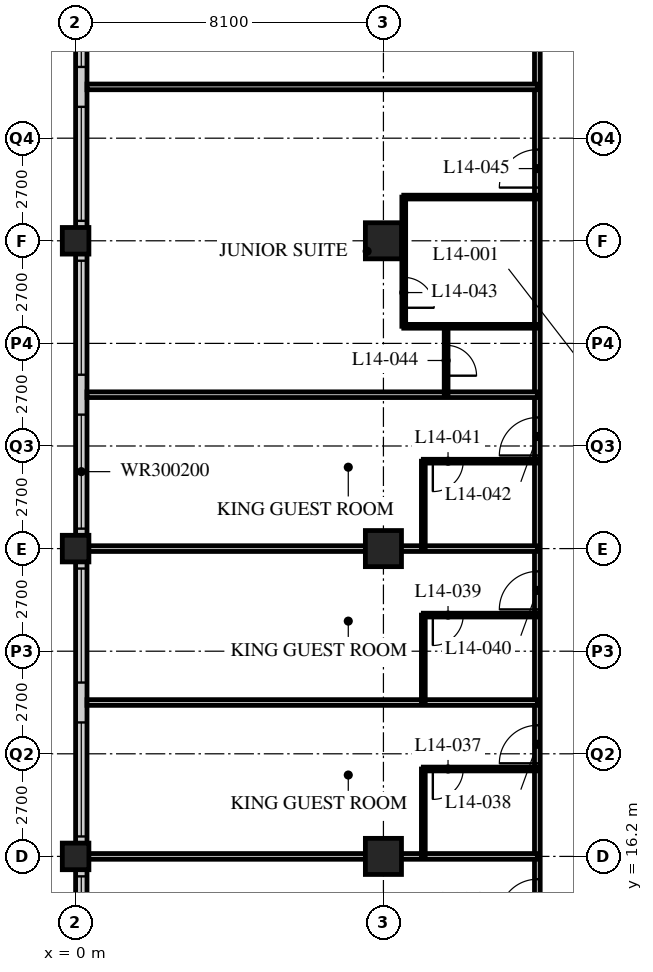
"""IFC4 building model, lengths in metres.
Left out: names, types, materials, properties, quantities, classifications, styles, units other than length and angle.
Written with IfcOpenShell. Run it as: python <this file> out.ifc"""

import sys

from ifc_helpers import new_model, si_unit, direction, frame, frame_2d, origin, origin_2d, place, context, subcontext, project, spatial, rectangle, hollow_rectangle, extrude, element, fill, save


model = new_model("IFC4")
c1 = context("Model", 3, precision=1e-05, world=origin(), true_north=direction((0.0, 1.0)))
c2 = subcontext(c1, "Body", "Model", "MODEL_VIEW")
j1 = project(units=[si_unit("LENGTHUNIT", "METRE"), si_unit("PLANEANGLEUNIT", "RADIAN")], contexts=[c1])
p1 = place(None, origin())
s1 = spatial("IfcSite", under=j1, at=p1, CompositionType="ELEMENT")
p2 = place(p1, origin())
s2 = spatial("IfcBuilding", under=s1, at=p2, CompositionType="ELEMENT")
p3 = place(p2, frame((0.0, 0.0, 60.2)))
s3 = spatial("IfcBuildingStorey", under=s2, at=p3, CompositionType="ELEMENT", Elevation=60.2)
for number, where, z_axis, x_axis in (
    (1, (0.0, 16.2, 0.0), (0.0, 0.0, 1.0), (1.0, 0.0, 0.0)),
    (2, (0.0, 24.3, 0.0), (0.0, 0.0, 1.0), (1.0, 0.0, 0.0)),
    (3, (0.0, 32.4, 0.0), (0.0, 0.0, 1.0), (1.0, 0.0, 0.0)),
):
    element("IfcColumn", number, at=place(p3, frame(where, z_axis=z_axis, x_axis=x_axis)), inside=s3, PredefinedType="COLUMN", context=c2, shape_type="SweptSolid", body=[
        extrude(hollow_rectangle(XDim=0.7, YDim=0.7, WallThickness=0.06, at=origin_2d()), origin(), (0.0, 0.0, 1.0), 3.4),
    ])
for number, where, z_axis, x_axis in (
    (4, (8.1, 16.2, 0.0), (0.0, 0.0, 1.0), (1.0, 0.0, 0.0)),
    (5, (8.1, 24.3, 0.0), (0.0, 0.0, 1.0), (1.0, 0.0, 0.0)),
    (6, (8.1, 32.4, 0.0), (0.0, 0.0, 1.0), (1.0, 0.0, 0.0)),
):
    element("IfcColumn", number, at=place(p3, frame(where, z_axis=z_axis, x_axis=x_axis)), inside=s3, PredefinedType="COLUMN", context=c2, shape_type="SweptSolid", body=[
        extrude(hollow_rectangle(XDim=0.95, YDim=0.95, WallThickness=0.095, at=origin_2d()), origin(), (0.0, 0.0, 1.0), 3.4),
    ])
p4 = place(p3, frame((0.15, 40.2, 0.0), z_axis=(0.0, 0.0, 1.0), x_axis=(0.0, -1.0, 0.0)))
e7 = element("IfcWall", 7, at=p4, inside=s3, PredefinedType="SOLIDWALL", context=c2, shape_type="SweptSolid", body=[
    extrude(rectangle(XDim=32.1, YDim=0.3, at=frame_2d((16.05, 0.0))), origin(), (0.0, 0.0, 1.0), 3.19),
])
p5 = place(p4, frame((0.225, 0.0, 0.9)))
e8 = element("IfcOpeningElement", 8, at=p5, cuts=e7, PredefinedType="OPENING", context=c2, shape_type="SweptSolid", body=[
    extrude(rectangle(XDim=3.0, YDim=2.0, at=frame_2d((1.5, 1.0))), frame((0.0, 0.16, 0.0), z_axis=(0.0, -1.0, 0.0), x_axis=(1.0, 0.0, 0.0)), (0.0, 0.0, 1.0), 0.32),
])
p6 = place(p4, frame((4.275, 0.0, 0.9)))
e9 = element("IfcOpeningElement", 9, at=p6, cuts=e7, PredefinedType="OPENING", context=c2, shape_type="SweptSolid", body=[
    extrude(rectangle(XDim=3.0, YDim=2.0, at=frame_2d((1.5, 1.0))), frame((0.0, 0.16, 0.0), z_axis=(0.0, -1.0, 0.0), x_axis=(1.0, 0.0, 0.0)), (0.0, 0.0, 1.0), 0.32),
])
p7 = place(p4, frame((8.325, 0.0, 0.9)))
e10 = element("IfcOpeningElement", 10, at=p7, cuts=e7, PredefinedType="OPENING", context=c2, shape_type="SweptSolid", body=[
    extrude(rectangle(XDim=3.0, YDim=2.0, at=frame_2d((1.5, 1.0))), frame((0.0, 0.16, 0.0), z_axis=(0.0, -1.0, 0.0), x_axis=(1.0, 0.0, 0.0)), (0.0, 0.0, 1.0), 0.32),
])
p8 = place(p4, frame((12.375, 0.0, 0.9)))
e11 = element("IfcOpeningElement", 11, at=p8, cuts=e7, PredefinedType="OPENING", context=c2, shape_type="SweptSolid", body=[
    extrude(rectangle(XDim=3.0, YDim=2.0, at=frame_2d((1.5, 1.0))), frame((0.0, 0.16, 0.0), z_axis=(0.0, -1.0, 0.0), x_axis=(1.0, 0.0, 0.0)), (0.0, 0.0, 1.0), 0.32),
])
p9 = place(p4, frame((16.425, 0.0, 0.9)))
e12 = element("IfcOpeningElement", 12, at=p9, cuts=e7, PredefinedType="OPENING", context=c2, shape_type="SweptSolid", body=[
    extrude(rectangle(XDim=3.0, YDim=2.0, at=frame_2d((1.5, 1.0))), frame((0.0, 0.16, 0.0), z_axis=(0.0, -1.0, 0.0), x_axis=(1.0, 0.0, 0.0)), (0.0, 0.0, 1.0), 0.32),
])
p10 = place(p4, frame((20.475, 0.0, 0.9)))
e13 = element("IfcOpeningElement", 13, at=p10, cuts=e7, PredefinedType="OPENING", context=c2, shape_type="SweptSolid", body=[
    extrude(rectangle(XDim=3.0, YDim=2.0, at=frame_2d((1.5, 1.0))), frame((0.0, 0.16, 0.0), z_axis=(0.0, -1.0, 0.0), x_axis=(1.0, 0.0, 0.0)), (0.0, 0.0, 1.0), 0.32),
])
p11 = place(p4, frame((24.525, 0.0, 0.9)))
e14 = element("IfcOpeningElement", 14, at=p11, cuts=e7, PredefinedType="OPENING", context=c2, shape_type="SweptSolid", body=[
    extrude(rectangle(XDim=3.0, YDim=2.0, at=frame_2d((1.5, 1.0))), frame((0.0, 0.16, 0.0), z_axis=(0.0, -1.0, 0.0), x_axis=(1.0, 0.0, 0.0)), (0.0, 0.0, 1.0), 0.32),
])
p12 = place(p4, frame((28.575, 0.0, 0.9)))
e15 = element("IfcOpeningElement", 15, at=p12, cuts=e7, PredefinedType="OPENING", context=c2, shape_type="SweptSolid", body=[
    extrude(rectangle(XDim=3.0, YDim=2.0, at=frame_2d((1.5, 1.0))), frame((0.0, 0.16, 0.0), z_axis=(0.0, -1.0, 0.0), x_axis=(1.0, 0.0, 0.0)), (0.0, 0.0, 1.0), 0.32),
])
p13 = place(p3, frame((12.15, 12.15, 0.0), z_axis=(0.0, 0.0, 1.0), x_axis=(0.0, 1.0, 0.0)))
e16 = element("IfcWall", 16, at=p13, inside=s3, PredefinedType="PARTITIONING", context=c2, shape_type="SweptSolid", body=[
    extrude(rectangle(XDim=30.15, YDim=0.15, at=frame_2d((15.075, 0.0))), origin(), (0.0, 0.0, 1.0), 3.19),
])
p14 = place(p13, frame((2.45, 0.0, 0.0)))
e17 = element("IfcOpeningElement", 17, at=p14, cuts=e16, PredefinedType="OPENING", context=c2, shape_type="SweptSolid", body=[
    extrude(rectangle(XDim=1.0, YDim=2.1, at=frame_2d((0.5, 1.05))), frame((0.0, 0.085, 0.0), z_axis=(0.0, -1.0, 0.0), x_axis=(1.0, 0.0, 0.0)), (0.0, 0.0, 1.0), 0.17),
])
p15 = place(p13, frame((6.5, 0.0, 0.0)))
e18 = element("IfcOpeningElement", 18, at=p15, cuts=e16, PredefinedType="OPENING", context=c2, shape_type="SweptSolid", body=[
    extrude(rectangle(XDim=1.0, YDim=2.1, at=frame_2d((0.5, 1.05))), frame((0.0, 0.085, 0.0), z_axis=(0.0, -1.0, 0.0), x_axis=(1.0, 0.0, 0.0)), (0.0, 0.0, 1.0), 0.17),
])
p16 = place(p13, frame((10.55, 0.0, 0.0)))
e19 = element("IfcOpeningElement", 19, at=p16, cuts=e16, PredefinedType="OPENING", context=c2, shape_type="SweptSolid", body=[
    extrude(rectangle(XDim=1.0, YDim=2.1, at=frame_2d((0.5, 1.05))), frame((0.0, 0.085, 0.0), z_axis=(0.0, -1.0, 0.0), x_axis=(1.0, 0.0, 0.0)), (0.0, 0.0, 1.0), 0.17),
])
p17 = place(p13, frame((14.6, 0.0, 0.0)))
e20 = element("IfcOpeningElement", 20, at=p17, cuts=e16, PredefinedType="OPENING", context=c2, shape_type="SweptSolid", body=[
    extrude(rectangle(XDim=1.0, YDim=2.1, at=frame_2d((0.5, 1.05))), frame((0.0, 0.085, 0.0), z_axis=(0.0, -1.0, 0.0), x_axis=(1.0, 0.0, 0.0)), (0.0, 0.0, 1.0), 0.17),
])
p18 = place(p13, frame((21.65, 0.0, 0.0)))
e21 = element("IfcOpeningElement", 21, at=p18, cuts=e16, PredefinedType="OPENING", context=c2, shape_type="SweptSolid", body=[
    extrude(rectangle(XDim=1.0, YDim=2.1, at=frame_2d((0.5, 1.05))), frame((0.0, 0.085, 0.0), z_axis=(0.0, -1.0, 0.0), x_axis=(1.0, 0.0, 0.0)), (0.0, 0.0, 1.0), 0.17),
])
p19 = place(p13, frame((26.7, 0.0, 0.0)))
e22 = element("IfcOpeningElement", 22, at=p19, cuts=e16, PredefinedType="OPENING", context=c2, shape_type="SweptSolid", body=[
    extrude(rectangle(XDim=1.0, YDim=2.1, at=frame_2d((0.5, 1.05))), frame((0.0, 0.085, 0.0), z_axis=(0.0, -1.0, 0.0), x_axis=(1.0, 0.0, 0.0)), (0.0, 0.0, 1.0), 0.17),
])
p20 = place(p3, frame((12.15, 16.2, 0.0), z_axis=(0.0, 0.0, 1.0), x_axis=(-1.0, 0.0, 0.0)))
e23 = element("IfcWall", 23, at=p20, inside=s3, PredefinedType="PARTITIONING", context=c2, shape_type="SweptSolid", body=[
    extrude(rectangle(XDim=11.85, YDim=0.15, at=frame_2d((5.925, 0.0))), origin(), (0.0, 0.0, 1.0), 2.578),
])
p21 = place(p3, frame((9.15, 16.2, 0.0), z_axis=(0.0, 0.0, 1.0), x_axis=(0.0, 1.0, 0.0)))
e24 = element("IfcWall", 24, at=p21, inside=s3, PredefinedType="PARTITIONING", context=c2, shape_type="SweptSolid", body=[
    extrude(rectangle(XDim=2.3, YDim=0.1, at=frame_2d((1.15, 0.0))), origin(), (0.0, 0.0, 1.0), 3.19),
])
p22 = place(p3, frame((12.15, 18.5, 0.0), z_axis=(0.0, 0.0, 1.0), x_axis=(-1.0, 0.0, 0.0)))
e25 = element("IfcWall", 25, at=p22, inside=s3, PredefinedType="PARTITIONING", context=c2, shape_type="SweptSolid", body=[
    extrude(rectangle(XDim=3.0, YDim=0.1, at=frame_2d((1.5, 0.0))), origin(), (0.0, 0.0, 1.0), 3.19),
])
p23 = place(p22, frame((1.95, 0.0, 0.0)))
e26 = element("IfcOpeningElement", 26, at=p23, cuts=e25, PredefinedType="OPENING", context=c2, shape_type="SweptSolid", body=[
    extrude(rectangle(XDim=0.8, YDim=2.1, at=frame_2d((0.4, 1.05))), frame((0.0, 0.06, 0.0), z_axis=(0.0, -1.0, 0.0), x_axis=(1.0, 0.0, 0.0)), (0.0, 0.0, 1.0), 0.12),
])
p24 = place(p3, frame((12.15, 20.25, 0.0), z_axis=(0.0, 0.0, 1.0), x_axis=(-1.0, 0.0, 0.0)))
e27 = element("IfcWall", 27, at=p24, inside=s3, PredefinedType="PARTITIONING", context=c2, shape_type="SweptSolid", body=[
    extrude(rectangle(XDim=11.85, YDim=0.15, at=frame_2d((5.925, 0.0))), origin(), (0.0, 0.0, 1.0), 3.19),
])
p25 = place(p3, frame((9.15, 20.25, 0.0), z_axis=(0.0, 0.0, 1.0), x_axis=(0.0, 1.0, 0.0)))
e28 = element("IfcWall", 28, at=p25, inside=s3, PredefinedType="PARTITIONING", context=c2, shape_type="SweptSolid", body=[
    extrude(rectangle(XDim=2.3, YDim=0.1, at=frame_2d((1.15, 0.0))), origin(), (0.0, 0.0, 1.0), 3.19),
])
p26 = place(p3, frame((12.15, 22.55, 0.0), z_axis=(0.0, 0.0, 1.0), x_axis=(-1.0, 0.0, 0.0)))
e29 = element("IfcWall", 29, at=p26, inside=s3, PredefinedType="PARTITIONING", context=c2, shape_type="SweptSolid", body=[
    extrude(rectangle(XDim=3.0, YDim=0.1, at=frame_2d((1.5, 0.0))), origin(), (0.0, 0.0, 1.0), 3.19),
])
p27 = place(p26, frame((1.95, 0.0, 0.0)))
e30 = element("IfcOpeningElement", 30, at=p27, cuts=e29, PredefinedType="OPENING", context=c2, shape_type="SweptSolid", body=[
    extrude(rectangle(XDim=0.8, YDim=2.1, at=frame_2d((0.4, 1.05))), frame((0.0, 0.06, 0.0), z_axis=(0.0, -1.0, 0.0), x_axis=(1.0, 0.0, 0.0)), (0.0, 0.0, 1.0), 0.12),
])
p28 = place(p3, frame((12.15, 24.3, 0.0), z_axis=(0.0, 0.0, 1.0), x_axis=(-1.0, 0.0, 0.0)))
e31 = element("IfcWall", 31, at=p28, inside=s3, PredefinedType="PARTITIONING", context=c2, shape_type="SweptSolid", body=[
    extrude(rectangle(XDim=11.85, YDim=0.15, at=frame_2d((5.925, 0.0))), origin(), (0.0, 0.0, 1.0), 2.578),
])
p29 = place(p3, frame((9.15, 24.3, 0.0), z_axis=(0.0, 0.0, 1.0), x_axis=(0.0, 1.0, 0.0)))
e32 = element("IfcWall", 32, at=p29, inside=s3, PredefinedType="PARTITIONING", context=c2, shape_type="SweptSolid", body=[
    extrude(rectangle(XDim=2.3, YDim=0.1, at=frame_2d((1.15, 0.0))), origin(), (0.0, 0.0, 1.0), 3.19),
])
p30 = place(p3, frame((12.15, 26.6, 0.0), z_axis=(0.0, 0.0, 1.0), x_axis=(-1.0, 0.0, 0.0)))
e33 = element("IfcWall", 33, at=p30, inside=s3, PredefinedType="PARTITIONING", context=c2, shape_type="SweptSolid", body=[
    extrude(rectangle(XDim=3.0, YDim=0.1, at=frame_2d((1.5, 0.0))), origin(), (0.0, 0.0, 1.0), 3.19),
])
p31 = place(p30, frame((1.95, 0.0, 0.0)))
e34 = element("IfcOpeningElement", 34, at=p31, cuts=e33, PredefinedType="OPENING", context=c2, shape_type="SweptSolid", body=[
    extrude(rectangle(XDim=0.8, YDim=2.1, at=frame_2d((0.4, 1.05))), frame((0.0, 0.06, 0.0), z_axis=(0.0, -1.0, 0.0), x_axis=(1.0, 0.0, 0.0)), (0.0, 0.0, 1.0), 0.12),
])
p32 = place(p3, frame((12.15, 28.35, 0.0), z_axis=(0.0, 0.0, 1.0), x_axis=(-1.0, 0.0, 0.0)))
e35 = element("IfcWall", 35, at=p32, inside=s3, PredefinedType="PARTITIONING", context=c2, shape_type="SweptSolid", body=[
    extrude(rectangle(XDim=11.85, YDim=0.15, at=frame_2d((5.925, 0.0))), origin(), (0.0, 0.0, 1.0), 3.19),
])
p33 = place(p3, frame((8.635, 30.15, 0.0), z_axis=(0.0, 0.0, 1.0), x_axis=(0.0, 1.0, 0.0)))
e36 = element("IfcWall", 36, at=p33, inside=s3, PredefinedType="PARTITIONING", context=c2, shape_type="SweptSolid", body=[
    extrude(rectangle(XDim=3.4, YDim=0.1, at=frame_2d((1.7, 0.0))), origin(), (0.0, 0.0, 1.0), 3.19),
])
p34 = place(p33, frame((0.488, 0.0, 0.0)))
e37 = element("IfcOpeningElement", 37, at=p34, cuts=e36, PredefinedType="OPENING", context=c2, shape_type="SweptSolid", body=[
    extrude(rectangle(XDim=0.8, YDim=2.1, at=frame_2d((0.4, 1.05))), frame((0.0, 0.06, 0.0), z_axis=(0.0, -1.0, 0.0), x_axis=(1.0, 0.0, 0.0)), (0.0, 0.0, 1.0), 0.12),
])
p35 = place(p3, frame((9.75, 28.35, 0.0), z_axis=(0.0, 0.0, 1.0), x_axis=(0.0, 1.0, 0.0)))
e38 = element("IfcWall", 38, at=p35, inside=s3, PredefinedType="PARTITIONING", context=c2, shape_type="SweptSolid", body=[
    extrude(rectangle(XDim=1.8, YDim=0.1, at=frame_2d((0.9, 0.0))), origin(), (0.0, 0.0, 1.0), 3.19),
])
p36 = place(p35, frame((0.5, 0.0, 0.0)))
e39 = element("IfcOpeningElement", 39, at=p36, cuts=e38, PredefinedType="OPENING", context=c2, shape_type="SweptSolid", body=[
    extrude(rectangle(XDim=0.8, YDim=2.1, at=frame_2d((0.4, 1.05))), frame((0.0, 0.06, 0.0), z_axis=(0.0, -1.0, 0.0), x_axis=(1.0, 0.0, 0.0)), (0.0, 0.0, 1.0), 0.12),
])
for number, where, z_axis, x_axis in (
    (40, (12.15, 30.15, 0.0), (0.0, 0.0, 1.0), (-1.0, 0.0, 0.0)),
    (41, (12.15, 33.55, 0.0), (0.0, 0.0, 1.0), (-1.0, 0.0, 0.0)),
):
    element("IfcWall", number, at=place(p3, frame(where, z_axis=z_axis, x_axis=x_axis)), inside=s3, PredefinedType="PARTITIONING", context=c2, shape_type="SweptSolid", body=[
        extrude(rectangle(XDim=3.515, YDim=0.1, at=frame_2d((1.757, 0.0))), origin(), (0.0, 0.0, 1.0), 3.19),
    ])
p37 = place(p3, frame((12.15, 36.45, 0.0), z_axis=(0.0, 0.0, 1.0), x_axis=(-1.0, 0.0, 0.0)))
e42 = element("IfcWall", 42, at=p37, inside=s3, PredefinedType="PARTITIONING", context=c2, shape_type="SweptSolid", body=[
    extrude(rectangle(XDim=11.85, YDim=0.15, at=frame_2d((5.925, 0.0))), origin(), (0.0, 0.0, 1.0), 3.19),
])
p38 = place(p5, origin())
e43 = element("IfcWindow", 43, at=p38, inside=s3, PartitioningType="SINGLE_PANEL", PredefinedType="WINDOW", context=c2, shape_type="SweptSolid", body=[
    extrude(rectangle(XDim=3.0, YDim=2.0, at=frame_2d((1.5, 1.0))), frame((0.0, 0.03, 0.0), z_axis=(0.0, -1.0, 0.0), x_axis=(1.0, 0.0, 0.0)), (0.0, 0.0, 1.0), 0.06),
])
fill(e8, e43)
p39 = place(p6, origin())
e44 = element("IfcWindow", 44, at=p39, inside=s3, PartitioningType="SINGLE_PANEL", PredefinedType="WINDOW", context=c2, shape_type="SweptSolid", body=[
    extrude(rectangle(XDim=3.0, YDim=2.0, at=frame_2d((1.5, 1.0))), frame((0.0, 0.03, 0.0), z_axis=(0.0, -1.0, 0.0), x_axis=(1.0, 0.0, 0.0)), (0.0, 0.0, 1.0), 0.06),
])
fill(e9, e44)
p40 = place(p7, origin())
e45 = element("IfcWindow", 45, at=p40, inside=s3, PartitioningType="SINGLE_PANEL", PredefinedType="WINDOW", context=c2, shape_type="SweptSolid", body=[
    extrude(rectangle(XDim=3.0, YDim=2.0, at=frame_2d((1.5, 1.0))), frame((0.0, 0.03, 0.0), z_axis=(0.0, -1.0, 0.0), x_axis=(1.0, 0.0, 0.0)), (0.0, 0.0, 1.0), 0.06),
])
fill(e10, e45)
p41 = place(p8, origin())
e46 = element("IfcWindow", 46, at=p41, inside=s3, PartitioningType="SINGLE_PANEL", PredefinedType="WINDOW", context=c2, shape_type="SweptSolid", body=[
    extrude(rectangle(XDim=3.0, YDim=2.0, at=frame_2d((1.5, 1.0))), frame((0.0, 0.03, 0.0), z_axis=(0.0, -1.0, 0.0), x_axis=(1.0, 0.0, 0.0)), (0.0, 0.0, 1.0), 0.06),
])
fill(e11, e46)
p42 = place(p9, origin())
e47 = element("IfcWindow", 47, at=p42, inside=s3, PartitioningType="SINGLE_PANEL", PredefinedType="WINDOW", context=c2, shape_type="SweptSolid", body=[
    extrude(rectangle(XDim=3.0, YDim=2.0, at=frame_2d((1.5, 1.0))), frame((0.0, 0.03, 0.0), z_axis=(0.0, -1.0, 0.0), x_axis=(1.0, 0.0, 0.0)), (0.0, 0.0, 1.0), 0.06),
])
fill(e12, e47)
p43 = place(p10, origin())
e48 = element("IfcWindow", 48, at=p43, inside=s3, PartitioningType="SINGLE_PANEL", PredefinedType="WINDOW", context=c2, shape_type="SweptSolid", body=[
    extrude(rectangle(XDim=3.0, YDim=2.0, at=frame_2d((1.5, 1.0))), frame((0.0, 0.03, 0.0), z_axis=(0.0, -1.0, 0.0), x_axis=(1.0, 0.0, 0.0)), (0.0, 0.0, 1.0), 0.06),
])
fill(e13, e48)
p44 = place(p11, origin())
e49 = element("IfcWindow", 49, at=p44, inside=s3, PartitioningType="SINGLE_PANEL", PredefinedType="WINDOW", context=c2, shape_type="SweptSolid", body=[
    extrude(rectangle(XDim=3.0, YDim=2.0, at=frame_2d((1.5, 1.0))), frame((0.0, 0.03, 0.0), z_axis=(0.0, -1.0, 0.0), x_axis=(1.0, 0.0, 0.0)), (0.0, 0.0, 1.0), 0.06),
])
fill(e14, e49)
p45 = place(p14, origin())
e50 = element("IfcDoor", 50, at=p45, inside=s3, OperationType="SINGLE_SWING_LEFT", PredefinedType="DOOR", context=c2, shape_type="SweptSolid", body=[
    extrude(rectangle(XDim=1.0, YDim=2.1, at=frame_2d((0.5, 1.05))), frame((0.0, 0.025, 0.0), z_axis=(0.0, -1.0, 0.0), x_axis=(1.0, 0.0, 0.0)), (0.0, 0.0, 1.0), 0.05),
])
fill(e17, e50)
p46 = place(p23, origin())
e51 = element("IfcDoor", 51, at=p46, inside=s3, OperationType="SINGLE_SWING_RIGHT", PredefinedType="DOOR", context=c2, shape_type="SweptSolid", body=[
    extrude(rectangle(XDim=0.8, YDim=2.1, at=frame_2d((0.4, 1.05))), frame((0.0, 0.025, 0.0), z_axis=(0.0, -1.0, 0.0), x_axis=(1.0, 0.0, 0.0)), (0.0, 0.0, 1.0), 0.05),
])
fill(e26, e51)
p47 = place(p15, origin())
e52 = element("IfcDoor", 52, at=p47, inside=s3, OperationType="SINGLE_SWING_LEFT", PredefinedType="DOOR", context=c2, shape_type="SweptSolid", body=[
    extrude(rectangle(XDim=1.0, YDim=2.1, at=frame_2d((0.5, 1.05))), frame((0.0, 0.025, 0.0), z_axis=(0.0, -1.0, 0.0), x_axis=(1.0, 0.0, 0.0)), (0.0, 0.0, 1.0), 0.05),
])
fill(e18, e52)
p48 = place(p27, origin())
e53 = element("IfcDoor", 53, at=p48, inside=s3, OperationType="SINGLE_SWING_RIGHT", PredefinedType="DOOR", context=c2, shape_type="SweptSolid", body=[
    extrude(rectangle(XDim=0.8, YDim=2.1, at=frame_2d((0.4, 1.05))), frame((0.0, 0.025, 0.0), z_axis=(0.0, -1.0, 0.0), x_axis=(1.0, 0.0, 0.0)), (0.0, 0.0, 1.0), 0.05),
])
fill(e30, e53)
p49 = place(p16, origin())
e54 = element("IfcDoor", 54, at=p49, inside=s3, OperationType="SINGLE_SWING_LEFT", PredefinedType="DOOR", context=c2, shape_type="SweptSolid", body=[
    extrude(rectangle(XDim=1.0, YDim=2.1, at=frame_2d((0.5, 1.05))), frame((0.0, 0.025, 0.0), z_axis=(0.0, -1.0, 0.0), x_axis=(1.0, 0.0, 0.0)), (0.0, 0.0, 1.0), 0.05),
])
fill(e19, e54)
p50 = place(p31, origin())
e55 = element("IfcDoor", 55, at=p50, inside=s3, OperationType="SINGLE_SWING_RIGHT", PredefinedType="DOOR", context=c2, shape_type="SweptSolid", body=[
    extrude(rectangle(XDim=0.8, YDim=2.1, at=frame_2d((0.4, 1.05))), frame((0.0, 0.025, 0.0), z_axis=(0.0, -1.0, 0.0), x_axis=(1.0, 0.0, 0.0)), (0.0, 0.0, 1.0), 0.05),
])
fill(e34, e55)
p51 = place(p17, origin())
e56 = element("IfcDoor", 56, at=p51, inside=s3, OperationType="SINGLE_SWING_LEFT", PredefinedType="DOOR", context=c2, shape_type="SweptSolid", body=[
    extrude(rectangle(XDim=1.0, YDim=2.1, at=frame_2d((0.5, 1.05))), frame((0.0, 0.025, 0.0), z_axis=(0.0, -1.0, 0.0), x_axis=(1.0, 0.0, 0.0)), (0.0, 0.0, 1.0), 0.05),
])
fill(e20, e56)
p52 = place(p34, origin())
e57 = element("IfcDoor", 57, at=p52, inside=s3, OperationType="SINGLE_SWING_RIGHT", PredefinedType="DOOR", context=c2, shape_type="SweptSolid", body=[
    extrude(rectangle(XDim=0.8, YDim=2.1, at=frame_2d((0.4, 1.05))), frame((0.0, 0.025, 0.0), z_axis=(0.0, -1.0, 0.0), x_axis=(1.0, 0.0, 0.0)), (0.0, 0.0, 1.0), 0.05),
])
fill(e37, e57)
p53 = place(p36, origin())
e58 = element("IfcDoor", 58, at=p53, inside=s3, OperationType="SINGLE_SWING_RIGHT", PredefinedType="DOOR", context=c2, shape_type="SweptSolid", body=[
    extrude(rectangle(XDim=0.8, YDim=2.1, at=frame_2d((0.4, 1.05))), frame((0.0, 0.025, 0.0), z_axis=(0.0, -1.0, 0.0), x_axis=(1.0, 0.0, 0.0)), (0.0, 0.0, 1.0), 0.05),
])
fill(e39, e58)
p54 = place(p18, origin())
e59 = element("IfcDoor", 59, at=p54, inside=s3, OperationType="SINGLE_SWING_LEFT", PredefinedType="DOOR", context=c2, shape_type="SweptSolid", body=[
    extrude(rectangle(XDim=1.0, YDim=2.1, at=frame_2d((0.5, 1.05))), frame((0.0, 0.025, 0.0), z_axis=(0.0, -1.0, 0.0), x_axis=(1.0, 0.0, 0.0)), (0.0, 0.0, 1.0), 0.05),
])
fill(e21, e59)
save(model, sys.argv[1])
